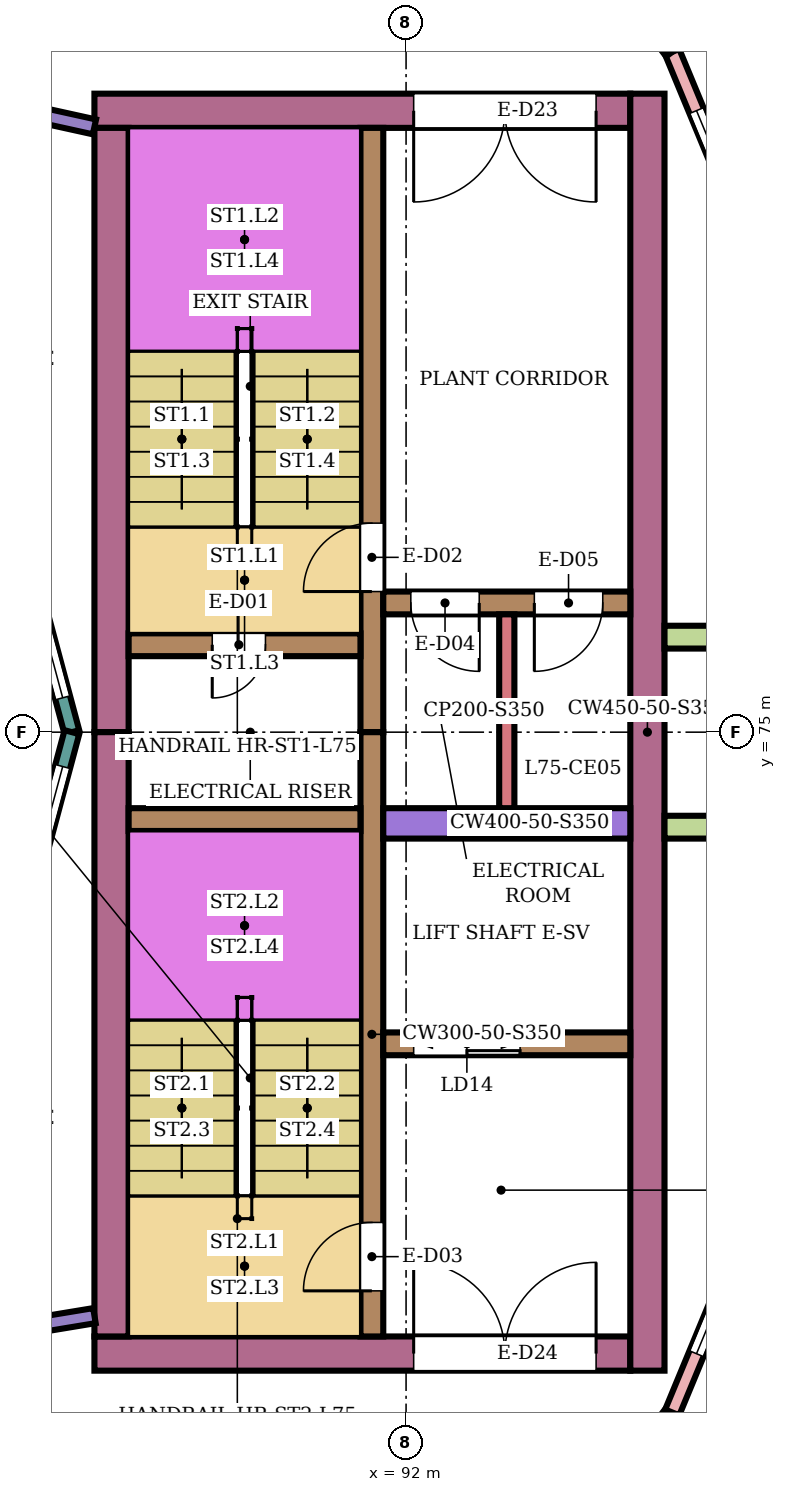
"""IFC4 building model, lengths in metres.
Left out: names, types, materials, properties, quantities, classifications, styles, units other than length and angle.
Written with IfcOpenShell. Run it as: python <this file> out.ifc"""

import sys

from ifc_helpers import new_model, si_unit, direction, frame, frame_2d, origin, place, context, subcontext, project, spatial, rectangle, extrude, element, fill, save


model = new_model("IFC4")
c1 = context("Model", 3, precision=1e-05, world=origin(), true_north=direction((0.0, 1.0)))
c2 = subcontext(c1, "Body", "Model", "MODEL_VIEW")
j1 = project(units=[si_unit("LENGTHUNIT", "METRE"), si_unit("PLANEANGLEUNIT", "RADIAN")], contexts=[c1])
p1 = place(None, origin())
s1 = spatial("IfcSite", under=j1, at=p1, CompositionType="ELEMENT")
p2 = place(p1, origin())
s2 = spatial("IfcBuilding", under=s1, at=p2, CompositionType="ELEMENT")
p3 = place(p2, frame((0.0, 0.0, 328.1)))
s3 = spatial("IfcBuildingStorey", under=s2, at=p3, CompositionType="ELEMENT", Elevation=328.1)
p4 = place(p3, frame((87.9, 83.175, 0.0), z_axis=(0.0, 0.0, 1.0), x_axis=(1.0, 0.0, 0.0)))
e1 = element("IfcWall", 1, at=p4, inside=s3, PredefinedType="SHEAR", context=c2, shape_type="SweptSolid", body=[
    extrude(rectangle(XDim=7.05, YDim=0.45, at=frame_2d((3.525, 0.0))), origin(), (0.0, 0.0, 1.0), 4.65),
])
p5 = place(p4, frame((4.2, 0.0, 0.0)))
e2 = element("IfcOpeningElement", 2, at=p5, cuts=e1, PredefinedType="OPENING", context=c2, shape_type="SweptSolid", body=[
    extrude(rectangle(XDim=2.4, YDim=2.4, at=frame_2d((1.2, 1.2))), frame((0.0, 0.235, 0.0), z_axis=(0.0, -1.0, 0.0), x_axis=(1.0, 0.0, 0.0)), (0.0, 0.0, 1.0), 0.47),
])
p6 = place(p3, frame((87.9, 66.825, 0.0), z_axis=(0.0, 0.0, 1.0), x_axis=(1.0, 0.0, 0.0)))
e3 = element("IfcWall", 3, at=p6, inside=s3, PredefinedType="SHEAR", context=c2, shape_type="SweptSolid", body=[
    extrude(rectangle(XDim=7.05, YDim=0.45, at=frame_2d((3.525, 0.0))), origin(), (0.0, 0.0, 1.0), 4.65),
])
p7 = place(p6, frame((4.2, 0.0, 0.0)))
e4 = element("IfcOpeningElement", 4, at=p7, cuts=e3, PredefinedType="OPENING", context=c2, shape_type="SweptSolid", body=[
    extrude(rectangle(XDim=2.4, YDim=2.4, at=frame_2d((1.2, 1.2))), frame((0.0, 0.235, 0.0), z_axis=(0.0, -1.0, 0.0), x_axis=(1.0, 0.0, 0.0)), (0.0, 0.0, 1.0), 0.47),
])
for number, where, z_axis, x_axis in (
    (5, (88.125, 75.0, 0.0), (0.0, 0.0, 1.0), (0.0, 1.0, 0.0)),
    (6, (88.125, 67.05, 0.0), (0.0, 0.0, 1.0), (0.0, 1.0, 0.0)),
):
    element("IfcWall", number, at=place(p3, frame(where, z_axis=z_axis, x_axis=x_axis)), inside=s3, PredefinedType="SHEAR", context=c2, shape_type="SweptSolid", body=[
        extrude(rectangle(XDim=7.95, YDim=0.45, at=frame_2d((3.975, 0.0))), origin(), (0.0, 0.0, 1.0), 4.65),
    ])
p8 = place(p3, frame((95.175, 66.6, 0.0), z_axis=(0.0, 0.0, 1.0), x_axis=(0.0, 1.0, 0.0)))
e7 = element("IfcWall", 7, at=p8, inside=s3, PredefinedType="SHEAR", context=c2, shape_type="SweptSolid", body=[
    extrude(rectangle(XDim=16.8, YDim=0.45, at=frame_2d((8.4, 0.0))), origin(), (0.0, 0.0, 1.0), 4.65),
])
p9 = place(p3, frame((91.55, 75.0, 0.0), z_axis=(0.0, 0.0, 1.0), x_axis=(0.0, 1.0, 0.0)))
e8 = element("IfcWall", 8, at=p9, inside=s3, PredefinedType="SHEAR", context=c2, shape_type="SweptSolid", body=[
    extrude(rectangle(XDim=7.95, YDim=0.3, at=frame_2d((3.975, 0.0))), origin(), (0.0, 0.0, 1.0), 4.65),
])
p10 = place(p9, frame((1.85, 0.0, 0.0)))
e9 = element("IfcOpeningElement", 9, at=p10, cuts=e8, PredefinedType="OPENING", context=c2, shape_type="SweptSolid", body=[
    extrude(rectangle(XDim=0.9, YDim=2.1, at=frame_2d((0.45, 1.05))), frame((0.0, 0.16, 0.0), z_axis=(0.0, -1.0, 0.0), x_axis=(1.0, 0.0, 0.0)), (0.0, 0.0, 1.0), 0.32),
])
p11 = place(p3, frame((91.55, 67.05, 0.0), z_axis=(0.0, 0.0, 1.0), x_axis=(0.0, 1.0, 0.0)))
e10 = element("IfcWall", 10, at=p11, inside=s3, PredefinedType="SHEAR", context=c2, shape_type="SweptSolid", body=[
    extrude(rectangle(XDim=7.95, YDim=0.3, at=frame_2d((3.975, 0.0))), origin(), (0.0, 0.0, 1.0), 4.65),
])
p12 = place(p11, frame((0.6, 0.0, 0.0)))
e11 = element("IfcOpeningElement", 11, at=p12, cuts=e10, PredefinedType="OPENING", context=c2, shape_type="SweptSolid", body=[
    extrude(rectangle(XDim=0.9, YDim=2.1, at=frame_2d((0.45, 1.05))), frame((0.0, 0.16, 0.0), z_axis=(0.0, -1.0, 0.0), x_axis=(1.0, 0.0, 0.0)), (0.0, 0.0, 1.0), 0.32),
])
p13 = place(p3, frame((88.35, 76.15, 0.0), z_axis=(0.0, 0.0, 1.0), x_axis=(1.0, 0.0, 0.0)))
e12 = element("IfcWall", 12, at=p13, inside=s3, PredefinedType="SHEAR", context=c2, shape_type="SweptSolid", body=[
    extrude(rectangle(XDim=3.05, YDim=0.3, at=frame_2d((1.525, 0.0))), origin(), (0.0, 0.0, 1.0), 4.65),
])
p14 = place(p13, frame((1.1, 0.0, 0.0)))
e13 = element("IfcOpeningElement", 13, at=p14, cuts=e12, PredefinedType="OPENING", context=c2, shape_type="SweptSolid", body=[
    extrude(rectangle(XDim=0.7, YDim=2.0, at=frame_2d((0.35, 1.0))), frame((0.0, 0.16, 0.0), z_axis=(0.0, -1.0, 0.0), x_axis=(1.0, 0.0, 0.0)), (0.0, 0.0, 1.0), 0.32),
])
p15 = place(p3, frame((88.35, 73.85, 0.0), z_axis=(0.0, 0.0, 1.0), x_axis=(1.0, 0.0, 0.0)))
e14 = element("IfcWall", 14, at=p15, inside=s3, PredefinedType="SHEAR", context=c2, shape_type="SweptSolid", body=[
    extrude(rectangle(XDim=3.05, YDim=0.3, at=frame_2d((1.525, 0.0))), origin(), (0.0, 0.0, 1.0), 4.65),
])
p16 = place(p3, frame((91.7, 76.7, 0.0), z_axis=(0.0, 0.0, 1.0), x_axis=(1.0, 0.0, 0.0)))
e15 = element("IfcWall", 15, at=p16, inside=s3, PredefinedType="SHEAR", context=c2, shape_type="SweptSolid", body=[
    extrude(rectangle(XDim=3.25, YDim=0.3, at=frame_2d((1.625, 0.0))), origin(), (0.0, 0.0, 1.0), 4.65),
])
p17 = place(p16, frame((0.363, 0.0, 0.0)))
e16 = element("IfcOpeningElement", 16, at=p17, cuts=e15, PredefinedType="OPENING", context=c2, shape_type="SweptSolid", body=[
    extrude(rectangle(XDim=0.9, YDim=2.1, at=frame_2d((0.45, 1.05))), frame((0.0, 0.16, 0.0), z_axis=(0.0, -1.0, 0.0), x_axis=(1.0, 0.0, 0.0)), (0.0, 0.0, 1.0), 0.32),
])
p18 = place(p16, frame((1.988, 0.0, 0.0)))
e17 = element("IfcOpeningElement", 17, at=p18, cuts=e15, PredefinedType="OPENING", context=c2, shape_type="SweptSolid", body=[
    extrude(rectangle(XDim=0.9, YDim=2.1, at=frame_2d((0.45, 1.05))), frame((0.0, 0.16, 0.0), z_axis=(0.0, -1.0, 0.0), x_axis=(1.0, 0.0, 0.0)), (0.0, 0.0, 1.0), 0.32),
])
p19 = place(p3, frame((91.7, 73.8, 0.0), z_axis=(0.0, 0.0, 1.0), x_axis=(1.0, 0.0, 0.0)))
e18 = element("IfcWall", 18, at=p19, inside=s3, PredefinedType="SHEAR", context=c2, shape_type="SweptSolid", body=[
    extrude(rectangle(XDim=3.25, YDim=0.4, at=frame_2d((1.625, 0.0))), origin(), (0.0, 0.0, 1.0), 4.65),
])
p20 = place(p3, frame((91.7, 70.9, 0.0), z_axis=(0.0, 0.0, 1.0), x_axis=(1.0, 0.0, 0.0)))
e19 = element("IfcWall", 19, at=p20, inside=s3, PredefinedType="SHEAR", context=c2, shape_type="SweptSolid", body=[
    extrude(rectangle(XDim=3.25, YDim=0.3, at=frame_2d((1.625, 0.0))), origin(), (0.0, 0.0, 1.0), 4.65),
])
p21 = place(p20, frame((0.4, 0.0, 0.0)))
e20 = element("IfcOpeningElement", 20, at=p21, cuts=e19, PredefinedType="OPENING", context=c2, shape_type="SweptSolid", body=[
    extrude(rectangle(XDim=1.4, YDim=2.1, at=frame_2d((0.7, 1.05))), frame((0.0, 0.16, 0.0), z_axis=(0.0, -1.0, 0.0), x_axis=(1.0, 0.0, 0.0)), (0.0, 0.0, 1.0), 0.32),
])
p22 = place(p3, frame((97.289, 79.633, 0.0), z_axis=(0.0, 0.0, 1.0), x_axis=(-0.382677892842, 0.923881827038, 0.0)))
e21 = element("IfcWall", 21, at=p22, inside=s3, PredefinedType="NOTDEFINED", context=c2, shape_type="SweptSolid", body=[
    extrude(rectangle(XDim=4.673, YDim=0.2, at=frame_2d((2.336, 0.0))), origin(), (0.0, 0.0, 1.0), 5.0),
])
p23 = place(p22, frame((0.836, 0.0, 0.5)))
e22 = element("IfcOpeningElement", 22, at=p23, cuts=e21, PredefinedType="OPENING", context=c2, shape_type="SweptSolid", body=[
    extrude(rectangle(XDim=3.0, YDim=3.7, at=frame_2d((1.5, 1.85))), frame((0.0, 0.11, 0.0), z_axis=(0.0, -1.0, 0.0), x_axis=(1.0, 0.0, 0.0)), (0.0, 0.0, 1.0), 0.22),
])
p24 = place(p3, frame((95.501, 83.949, 0.0), z_axis=(0.0, 0.0, 1.0), x_axis=(-0.608780431243, 0.793338759003, 0.0)))
e23 = element("IfcWall", 23, at=p24, inside=s3, PredefinedType="NOTDEFINED", context=c2, shape_type="SweptSolid", body=[
    extrude(rectangle(XDim=3.261, YDim=0.2, at=frame_2d((1.63, 0.0))), origin(), (0.0, 0.0, 1.0), 5.0),
])
p25 = place(p24, frame((0.83, 0.0, 0.5)))
e24 = element("IfcOpeningElement", 24, at=p25, cuts=e23, PredefinedType="OPENING", context=c2, shape_type="SweptSolid", body=[
    extrude(rectangle(XDim=1.6, YDim=3.7, at=frame_2d((0.8, 1.85))), frame((0.0, 0.11, 0.0), z_axis=(0.0, -1.0, 0.0), x_axis=(1.0, 0.0, 0.0)), (0.0, 0.0, 1.0), 0.22),
])
p26 = place(p3, frame((93.516, 63.464, 0.0), z_axis=(0.0, 0.0, 1.0), x_axis=(0.608780431243, 0.793338759003, 0.0)))
e25 = element("IfcWall", 25, at=p26, inside=s3, PredefinedType="NOTDEFINED", context=c2, shape_type="SweptSolid", body=[
    extrude(rectangle(XDim=3.261, YDim=0.2, at=frame_2d((1.63, 0.0))), origin(), (0.0, 0.0, 1.0), 5.0),
])
p27 = place(p26, frame((0.83, 0.0, 0.5)))
e26 = element("IfcOpeningElement", 26, at=p27, cuts=e25, PredefinedType="OPENING", context=c2, shape_type="SweptSolid", body=[
    extrude(rectangle(XDim=1.6, YDim=3.7, at=frame_2d((0.8, 1.85))), frame((0.0, 0.11, 0.0), z_axis=(0.0, -1.0, 0.0), x_axis=(1.0, 0.0, 0.0)), (0.0, 0.0, 1.0), 0.22),
])
p28 = place(p3, frame((95.501, 66.051, 0.0), z_axis=(0.0, 0.0, 1.0), x_axis=(0.382677892842, 0.923881827038, 0.0)))
e27 = element("IfcWall", 27, at=p28, inside=s3, PredefinedType="NOTDEFINED", context=c2, shape_type="SweptSolid", body=[
    extrude(rectangle(XDim=4.673, YDim=0.2, at=frame_2d((2.336, 0.0))), origin(), (0.0, 0.0, 1.0), 5.0),
])
p29 = place(p28, frame((0.836, 0.0, 0.5)))
e28 = element("IfcOpeningElement", 28, at=p29, cuts=e27, PredefinedType="OPENING", context=c2, shape_type="SweptSolid", body=[
    extrude(rectangle(XDim=3.0, YDim=3.7, at=frame_2d((1.5, 1.85))), frame((0.0, 0.11, 0.0), z_axis=(0.0, -1.0, 0.0), x_axis=(1.0, 0.0, 0.0)), (0.0, 0.0, 1.0), 0.22),
])
for number, where, z_axis, x_axis in (
    (29, (95.4, 73.75, 0.0), (0.0, 0.0, 1.0), (1.0, 0.0, 0.0)),
    (30, (95.4, 76.25, 0.0), (0.0, 0.0, 1.0), (1.0, 0.0, 0.0)),
):
    element("IfcWall", number, at=place(p3, frame(where, z_axis=z_axis, x_axis=x_axis)), inside=s3, PredefinedType="NOTDEFINED", context=c2, shape_type="SweptSolid", body=[
        extrude(rectangle(XDim=2.416, YDim=0.3, at=frame_2d((1.208, 0.0))), origin(), (0.0, 0.0, 1.0), 5.0),
    ])
p30 = place(p3, frame((87.604, 75.0, 0.0), z_axis=(0.0, 0.0, 1.0), x_axis=(-0.258789828301, 0.965933654434, 0.0)))
e31 = element("IfcWall", 31, at=p30, inside=s3, PredefinedType="NOTDEFINED", context=c2, shape_type="SweptSolid", body=[
    extrude(rectangle(XDim=3.936, YDim=0.2, at=frame_2d((1.968, 0.0))), origin(), (0.0, 0.0, 1.0), 5.0),
])
p31 = place(p30, frame((0.468, 0.0, 0.9)))
e32 = element("IfcOpeningElement", 32, at=p31, cuts=e31, PredefinedType="OPENING", context=c2, shape_type="SweptSolid", body=[
    extrude(rectangle(XDim=3.0, YDim=2.3, at=frame_2d((1.5, 1.15))), frame((0.0, 0.11, 0.0), z_axis=(0.0, -1.0, 0.0), x_axis=(1.0, 0.0, 0.0)), (0.0, 0.0, 1.0), 0.22),
])
p32 = place(p3, frame((86.585, 71.198, 0.0), z_axis=(0.0, 0.0, 1.0), x_axis=(0.258789828301, 0.965933654434, 0.0)))
e33 = element("IfcWall", 33, at=p32, inside=s3, PredefinedType="NOTDEFINED", context=c2, shape_type="SweptSolid", body=[
    extrude(rectangle(XDim=3.936, YDim=0.2, at=frame_2d((1.968, 0.0))), origin(), (0.0, 0.0, 1.0), 5.0),
])
p33 = place(p32, frame((0.468, 0.0, 0.9)))
e34 = element("IfcOpeningElement", 34, at=p33, cuts=e33, PredefinedType="OPENING", context=c2, shape_type="SweptSolid", body=[
    extrude(rectangle(XDim=3.0, YDim=2.3, at=frame_2d((1.5, 1.15))), frame((0.0, 0.11, 0.0), z_axis=(0.0, -1.0, 0.0), x_axis=(1.0, 0.0, 0.0)), (0.0, 0.0, 1.0), 0.22),
])
p34 = place(p3, frame((85.121, 66.865, 0.0), z_axis=(0.0, 0.0, 1.0), x_axis=(0.986631847158, 0.162965021319, 0.0)))
e35 = element("IfcWall", 35, at=p34, inside=s3, PredefinedType="PARTITIONING", context=c2, shape_type="SweptSolid", body=[
    extrude(rectangle(XDim=2.816, YDim=0.2, at=frame_2d((1.408, 0.0))), origin(), (0.0, 0.0, 1.0), 4.55),
])
p35 = place(p34, frame((0.808, 0.0, 0.0)))
e36 = element("IfcOpeningElement", 36, at=p35, cuts=e35, PredefinedType="OPENING", context=c2, shape_type="SweptSolid", body=[
    extrude(rectangle(XDim=1.2, YDim=2.4, at=frame_2d((0.6, 1.2))), frame((0.0, 0.11, 0.0), z_axis=(0.0, -1.0, 0.0), x_axis=(1.0, 0.0, 0.0)), (0.0, 0.0, 1.0), 0.22),
])
p36 = place(p3, frame((85.315, 83.533, 0.0), z_axis=(0.0, 0.0, 1.0), x_axis=(0.97653518439, -0.215357919867, 0.0)))
e37 = element("IfcWall", 37, at=p36, inside=s3, PredefinedType="PARTITIONING", context=c2, shape_type="SweptSolid", body=[
    extrude(rectangle(XDim=2.647, YDim=0.2, at=frame_2d((1.323, 0.0))), origin(), (0.0, 0.0, 1.0), 4.55),
])
p37 = place(p36, frame((0.723, 0.0, 0.0)))
e38 = element("IfcOpeningElement", 38, at=p37, cuts=e37, PredefinedType="OPENING", context=c2, shape_type="SweptSolid", body=[
    extrude(rectangle(XDim=1.2, YDim=2.4, at=frame_2d((0.6, 1.2))), frame((0.0, 0.11, 0.0), z_axis=(0.0, -1.0, 0.0), x_axis=(1.0, 0.0, 0.0)), (0.0, 0.0, 1.0), 0.22),
])
p38 = place(p3, frame((93.325, 74.0, 0.0), z_axis=(0.0, 0.0, 1.0), x_axis=(0.0, 1.0, 0.0)))
e39 = element("IfcWall", 39, at=p38, inside=s3, PredefinedType="PARTITIONING", context=c2, shape_type="SweptSolid", body=[
    extrude(rectangle(XDim=2.55, YDim=0.2, at=frame_2d((1.275, 0.0))), origin(), (0.0, 0.0, 1.0), 4.65),
])
p39 = place(p23, origin())
e40 = element("IfcWindow", 40, at=p39, inside=s3, PartitioningType="SINGLE_PANEL", PredefinedType="USERDEFINED", context=c2, shape_type="SweptSolid", body=[
    extrude(rectangle(XDim=3.0, YDim=3.7, at=frame_2d((1.5, 1.85))), frame((0.0, 0.03, 0.0), z_axis=(0.0, -1.0, 0.0), x_axis=(1.0, 0.0, 0.0)), (0.0, 0.0, 1.0), 0.06),
])
fill(e22, e40)
p40 = place(p29, origin())
e41 = element("IfcWindow", 41, at=p40, inside=s3, PartitioningType="SINGLE_PANEL", PredefinedType="USERDEFINED", context=c2, shape_type="SweptSolid", body=[
    extrude(rectangle(XDim=3.0, YDim=3.7, at=frame_2d((1.5, 1.85))), frame((0.0, 0.03, 0.0), z_axis=(0.0, -1.0, 0.0), x_axis=(1.0, 0.0, 0.0)), (0.0, 0.0, 1.0), 0.06),
])
fill(e28, e41)
p41 = place(p31, origin())
e42 = element("IfcWindow", 42, at=p41, inside=s3, PartitioningType="SINGLE_PANEL", PredefinedType="WINDOW", context=c2, shape_type="SweptSolid", body=[
    extrude(rectangle(XDim=3.0, YDim=2.3, at=frame_2d((1.5, 1.15))), frame((0.0, 0.03, 0.0), z_axis=(0.0, -1.0, 0.0), x_axis=(1.0, 0.0, 0.0)), (0.0, 0.0, 1.0), 0.06),
])
fill(e32, e42)
p42 = place(p33, origin())
e43 = element("IfcWindow", 43, at=p42, inside=s3, PartitioningType="SINGLE_PANEL", PredefinedType="WINDOW", context=c2, shape_type="SweptSolid", body=[
    extrude(rectangle(XDim=3.0, YDim=2.3, at=frame_2d((1.5, 1.15))), frame((0.0, 0.03, 0.0), z_axis=(0.0, -1.0, 0.0), x_axis=(1.0, 0.0, 0.0)), (0.0, 0.0, 1.0), 0.06),
])
fill(e34, e43)
p43 = place(p14, frame((0.7, 0.0, 0.0), z_axis=(0.0, 0.0, 1.0), x_axis=(-1.0, 0.0, 0.0)))
e44 = element("IfcDoor", 44, at=p43, inside=s3, OperationType="SINGLE_SWING_RIGHT", PredefinedType="DOOR", context=c2, shape_type="SweptSolid", body=[
    extrude(rectangle(XDim=0.7, YDim=2.0, at=frame_2d((0.35, 1.0))), frame((0.0, 0.025, 0.0), z_axis=(0.0, -1.0, 0.0), x_axis=(1.0, 0.0, 0.0)), (0.0, 0.0, 1.0), 0.05),
])
fill(e13, e44)
p44 = place(p10, origin())
e45 = element("IfcDoor", 45, at=p44, inside=s3, OperationType="SINGLE_SWING_LEFT", PredefinedType="DOOR", context=c2, shape_type="SweptSolid", body=[
    extrude(rectangle(XDim=0.9, YDim=2.1, at=frame_2d((0.45, 1.05))), frame((0.0, 0.025, 0.0), z_axis=(0.0, -1.0, 0.0), x_axis=(1.0, 0.0, 0.0)), (0.0, 0.0, 1.0), 0.05),
])
fill(e9, e45)
p45 = place(p12, origin())
e46 = element("IfcDoor", 46, at=p45, inside=s3, OperationType="SINGLE_SWING_LEFT", PredefinedType="DOOR", context=c2, shape_type="SweptSolid", body=[
    extrude(rectangle(XDim=0.9, YDim=2.1, at=frame_2d((0.45, 1.05))), frame((0.0, 0.025, 0.0), z_axis=(0.0, -1.0, 0.0), x_axis=(1.0, 0.0, 0.0)), (0.0, 0.0, 1.0), 0.05),
])
fill(e11, e46)
p46 = place(p17, frame((0.9, 0.0, 0.0), z_axis=(0.0, 0.0, 1.0), x_axis=(-1.0, 0.0, 0.0)))
e47 = element("IfcDoor", 47, at=p46, inside=s3, OperationType="SINGLE_SWING_LEFT", PredefinedType="DOOR", context=c2, shape_type="SweptSolid", body=[
    extrude(rectangle(XDim=0.9, YDim=2.1, at=frame_2d((0.45, 1.05))), frame((0.0, 0.025, 0.0), z_axis=(0.0, -1.0, 0.0), x_axis=(1.0, 0.0, 0.0)), (0.0, 0.0, 1.0), 0.05),
])
fill(e16, e47)
p47 = place(p18, frame((0.9, 0.0, 0.0), z_axis=(0.0, 0.0, 1.0), x_axis=(-1.0, 0.0, 0.0)))
e48 = element("IfcDoor", 48, at=p47, inside=s3, OperationType="SINGLE_SWING_RIGHT", PredefinedType="DOOR", context=c2, shape_type="SweptSolid", body=[
    extrude(rectangle(XDim=0.9, YDim=2.1, at=frame_2d((0.45, 1.05))), frame((0.0, 0.025, 0.0), z_axis=(0.0, -1.0, 0.0), x_axis=(1.0, 0.0, 0.0)), (0.0, 0.0, 1.0), 0.05),
])
fill(e17, e48)
p48 = place(p21, origin())
e49 = element("IfcDoor", 49, at=p48, inside=s3, OperationType="DOUBLE_DOOR_SLIDING", PredefinedType="DOOR", context=c2, shape_type="SweptSolid", body=[
    extrude(rectangle(XDim=1.4, YDim=2.1, at=frame_2d((0.7, 1.05))), frame((0.0, 0.025, 0.0), z_axis=(0.0, -1.0, 0.0), x_axis=(1.0, 0.0, 0.0)), (0.0, 0.0, 1.0), 0.05),
])
fill(e20, e49)
p49 = place(p5, frame((2.4, 0.0, 0.0), z_axis=(0.0, 0.0, 1.0), x_axis=(-1.0, 0.0, 0.0)))
e50 = element("IfcDoor", 50, at=p49, inside=s3, OperationType="DOUBLE_DOOR_SINGLE_SWING", PredefinedType="DOOR", context=c2, shape_type="SweptSolid", body=[
    extrude(rectangle(XDim=2.4, YDim=2.4, at=frame_2d((1.2, 1.2))), frame((0.0, 0.025, 0.0), z_axis=(0.0, -1.0, 0.0), x_axis=(1.0, 0.0, 0.0)), (0.0, 0.0, 1.0), 0.05),
])
fill(e2, e50)
p50 = place(p7, origin())
e51 = element("IfcDoor", 51, at=p50, inside=s3, OperationType="DOUBLE_DOOR_SINGLE_SWING", PredefinedType="DOOR", context=c2, shape_type="SweptSolid", body=[
    extrude(rectangle(XDim=2.4, YDim=2.4, at=frame_2d((1.2, 1.2))), frame((0.0, 0.025, 0.0), z_axis=(0.0, -1.0, 0.0), x_axis=(1.0, 0.0, 0.0)), (0.0, 0.0, 1.0), 0.05),
])
fill(e4, e51)
save(model, sys.argv[1])
